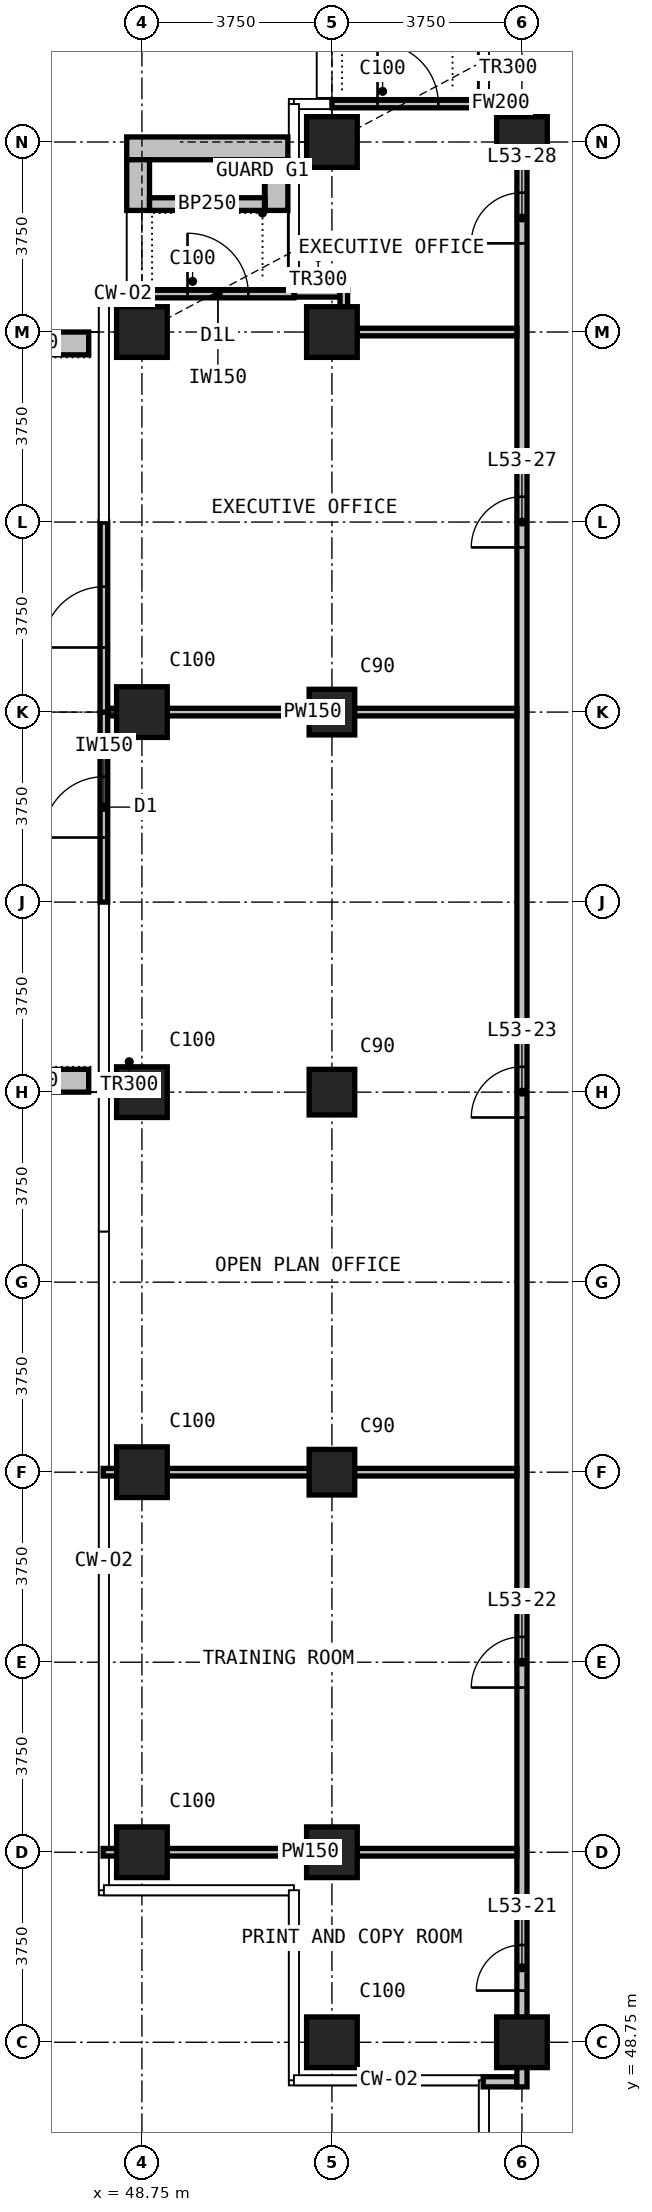
"""IFC4 building model, lengths in metres.
Left out: names, types, materials, properties, quantities, classifications, styles, units other than length and angle.
Written with IfcOpenShell. Run it as: python <this file> out.ifc"""

import sys

from ifc_helpers import new_model, si_unit, direction, frame, frame_2d, origin, origin_2d, place, context, subcontext, project, spatial, rectangle, extrude, element, fill, save


model = new_model("IFC4")
c1 = context("Model", 3, precision=1e-05, world=origin(), true_north=direction((0.0, 1.0)))
c2 = subcontext(c1, "Body", "Model", "MODEL_VIEW")
j1 = project(units=[si_unit("LENGTHUNIT", "METRE"), si_unit("PLANEANGLEUNIT", "RADIAN")], contexts=[c1])
p1 = place(None, origin())
s1 = spatial("IfcSite", under=j1, at=p1, CompositionType="ELEMENT")
p2 = place(p1, origin())
s2 = spatial("IfcBuilding", under=s1, at=p2, CompositionType="ELEMENT")
p3 = place(p2, frame((0.0, 0.0, 206.7)))
s3 = spatial("IfcBuildingStorey", under=s2, at=p3, CompositionType="ELEMENT", Elevation=206.7)
for number, where, z_axis, x_axis in (
    (1, (48.75, 52.5, 0.0), (0.0, 0.0, 1.0), (1.0, 0.0, 0.0)),
    (2, (48.75, 60.0, 0.0), (0.0, 0.0, 1.0), (1.0, 0.0, 0.0)),
    (3, (48.75, 67.5, 0.0), (0.0, 0.0, 1.0), (1.0, 0.0, 0.0)),
    (4, (48.75, 75.0, 0.0), (0.0, 0.0, 1.0), (1.0, 0.0, 0.0)),
    (5, (48.75, 82.5, 0.0), (0.0, 0.0, 1.0), (1.0, 0.0, 0.0)),
    (6, (52.5, 48.75, 0.0), (0.0, 0.0, 1.0), (1.0, 0.0, 0.0)),
    (7, (52.5, 52.5, 0.0), (0.0, 0.0, 1.0), (1.0, 0.0, 0.0)),
):
    element("IfcColumn", number, at=place(p3, frame(where, z_axis=z_axis, x_axis=x_axis)), inside=s3, PredefinedType="COLUMN", context=c2, shape_type="SweptSolid", body=[
        extrude(rectangle(XDim=1.0, YDim=1.0, at=origin_2d()), origin(), (0.0, 0.0, 1.0), 3.6),
    ])
for number, where, z_axis, x_axis in (
    (8, (52.5, 60.0, 0.0), (0.0, 0.0, 1.0), (1.0, 0.0, 0.0)),
    (9, (52.5, 67.5, 0.0), (0.0, 0.0, 1.0), (1.0, 0.0, 0.0)),
    (10, (52.5, 75.0, 0.0), (0.0, 0.0, 1.0), (1.0, 0.0, 0.0)),
):
    element("IfcColumn", number, at=place(p3, frame(where, z_axis=z_axis, x_axis=x_axis)), inside=s3, PredefinedType="COLUMN", context=c2, shape_type="SweptSolid", body=[
        extrude(rectangle(XDim=0.9, YDim=0.9, at=origin_2d()), origin(), (0.0, 0.0, 1.0), 3.6),
    ])
for number, where, z_axis, x_axis in (
    (11, (52.5, 82.5, 0.0), (0.0, 0.0, 1.0), (1.0, 0.0, 0.0)),
    (12, (52.5, 86.25, 0.0), (0.0, 0.0, 1.0), (1.0, 0.0, 0.0)),
    (13, (56.25, 48.75, 0.0), (0.0, 0.0, 1.0), (1.0, 0.0, 0.0)),
    (14, (56.25, 86.25, 0.0), (0.0, 0.0, 1.0), (1.0, 0.0, 0.0)),
):
    element("IfcColumn", number, at=place(p3, frame(where, z_axis=z_axis, x_axis=x_axis)), inside=s3, PredefinedType="COLUMN", context=c2, shape_type="SweptSolid", body=[
        extrude(rectangle(XDim=1.0, YDim=1.0, at=origin_2d()), origin(), (0.0, 0.0, 1.0), 3.6),
    ])
p4 = place(p3, frame((52.5, 87.0, 0.0), z_axis=(0.0, 0.0, 1.0), x_axis=(1.0, 0.0, 0.0)))
e15 = element("IfcWall", 15, at=p4, inside=s3, PredefinedType="SOLIDWALL", context=c2, shape_type="SweptSolid", body=[
    extrude(rectangle(XDim=3.0, YDim=0.15, at=frame_2d((1.5, 0.0))), origin(), (0.0, 0.0, 1.0), 3.3),
])
p5 = place(p4, frame((0.9, 0.0, 0.0)))
e16 = element("IfcOpeningElement", 16, at=p5, cuts=e15, PredefinedType="OPENING", context=c2, shape_type="SweptSolid", body=[
    extrude(rectangle(XDim=1.2, YDim=2.0, at=frame_2d((0.6, 1.0))), frame((0.0, 0.085, 0.0), z_axis=(0.0, -1.0, 0.0), x_axis=(1.0, 0.0, 0.0)), (0.0, 0.0, 1.0), 0.17),
])
p6 = place(p3, frame((48.75, 83.25, 0.0), z_axis=(0.0, 0.0, 1.0), x_axis=(1.0, 0.0, 0.0)))
e17 = element("IfcWall", 17, at=p6, inside=s3, PredefinedType="SOLIDWALL", context=c2, shape_type="SweptSolid", body=[
    extrude(rectangle(XDim=3.0, YDim=0.15, at=frame_2d((1.5, 0.0))), origin(), (0.0, 0.0, 1.0), 3.3),
])
p7 = place(p6, frame((0.9, 0.0, 0.0)))
e18 = element("IfcOpeningElement", 18, at=p7, cuts=e17, PredefinedType="OPENING", context=c2, shape_type="SweptSolid", body=[
    extrude(rectangle(XDim=1.2, YDim=2.0, at=frame_2d((0.6, 1.0))), frame((0.0, 0.085, 0.0), z_axis=(0.0, -1.0, 0.0), x_axis=(1.0, 0.0, 0.0)), (0.0, 0.0, 1.0), 0.17),
])
p8 = place(p3, frame((48.0, 71.25, 0.0), z_axis=(0.0, 0.0, 1.0), x_axis=(0.0, 1.0, 0.0)))
e19 = element("IfcWall", 19, at=p8, inside=s3, PredefinedType="SOLIDWALL", context=c2, shape_type="SweptSolid", body=[
    extrude(rectangle(XDim=3.75, YDim=0.15, at=frame_2d((1.875, 0.0))), origin(), (0.0, 0.0, 1.0), 3.3),
])
p9 = place(p8, frame((1.275, 0.0, 0.0)))
e20 = element("IfcOpeningElement", 20, at=p9, cuts=e19, PredefinedType="OPENING", context=c2, shape_type="SweptSolid", body=[
    extrude(rectangle(XDim=1.2, YDim=2.4, at=frame_2d((0.6, 1.2))), frame((0.0, 0.085, 0.0), z_axis=(0.0, -1.0, 0.0), x_axis=(1.0, 0.0, 0.0)), (0.0, 0.0, 1.0), 0.17),
])
p10 = place(p3, frame((48.0, 75.0, 0.0), z_axis=(0.0, 0.0, 1.0), x_axis=(0.0, 1.0, 0.0)))
e21 = element("IfcWall", 21, at=p10, inside=s3, PredefinedType="SOLIDWALL", context=c2, shape_type="SweptSolid", body=[
    extrude(rectangle(XDim=3.75, YDim=0.15, at=frame_2d((1.875, 0.0))), origin(), (0.0, 0.0, 1.0), 3.3),
])
p11 = place(p10, frame((1.275, 0.0, 0.0)))
e22 = element("IfcOpeningElement", 22, at=p11, cuts=e21, PredefinedType="OPENING", context=c2, shape_type="SweptSolid", body=[
    extrude(rectangle(XDim=1.2, YDim=2.4, at=frame_2d((0.6, 1.2))), frame((0.0, 0.085, 0.0), z_axis=(0.0, -1.0, 0.0), x_axis=(1.0, 0.0, 0.0)), (0.0, 0.0, 1.0), 0.17),
])
p12 = place(p3, frame((48.45, 86.125, 0.0), z_axis=(0.0, 0.0, 1.0), x_axis=(1.0, 0.0, 0.0)))
e23 = element("IfcWall", 23, at=p12, inside=s3, PredefinedType="USERDEFINED", context=c2, shape_type="SweptSolid", body=[
    extrude(rectangle(XDim=3.18, YDim=0.45, at=frame_2d((1.59, 0.0))), origin(), (0.0, 0.0, 1.0), 1.1),
])
for number, where, z_axis, x_axis in (
    (24, (48.675, 84.9, 0.0), (0.0, 0.0, 1.0), (0.0, 1.0, 0.0)),
    (25, (51.405, 84.9, 0.0), (0.0, 0.0, 1.0), (0.0, 1.0, 0.0)),
):
    element("IfcWall", number, at=place(p3, frame(where, z_axis=z_axis, x_axis=x_axis)), inside=s3, PredefinedType="USERDEFINED", context=c2, shape_type="SweptSolid", body=[
        extrude(rectangle(XDim=1.0, YDim=0.45, at=frame_2d((0.5, 0.0))), origin(), (0.0, 0.0, 1.0), 1.1),
    ])
p13 = place(p3, frame((48.9, 85.025, 0.0), z_axis=(0.0, 0.0, 1.0), x_axis=(1.0, 0.0, 0.0)))
e26 = element("IfcWall", 26, at=p13, inside=s3, PredefinedType="USERDEFINED", context=c2, shape_type="SweptSolid", body=[
    extrude(rectangle(XDim=2.28, YDim=0.25, at=frame_2d((1.14, 0.0))), origin(), (0.0, 0.0, 1.0), 1.0),
])
for number, where, z_axis, x_axis in (
    (27, (47.7, 67.725, 0.0), (0.0, 0.0, 1.0), (-1.0, 0.0, 0.0)),
    (28, (47.7, 82.275, 0.0), (0.0, 0.0, 1.0), (-1.0, 0.0, 0.0)),
):
    element("IfcWall", number, at=place(p3, frame(where, z_axis=z_axis, x_axis=x_axis)), inside=s3, PredefinedType="USERDEFINED", context=c2, shape_type="SweptSolid", body=[
        extrude(rectangle(XDim=2.35, YDim=0.45, at=frame_2d((1.175, 0.0))), origin(), (0.0, 0.0, 1.0), 1.1),
    ])
p14 = place(p3, frame((55.485, 47.97, 0.0), z_axis=(0.0, 0.0, 1.0), x_axis=(1.0, 0.0, 0.0)))
e29 = element("IfcWall", 29, at=p14, inside=s3, PredefinedType="PARTITIONING", context=c2, shape_type="SweptSolid", body=[
    extrude(rectangle(XDim=0.665, YDim=0.2, at=frame_2d((0.333, 0.0))), origin(), (0.0, 0.0, 1.0), 3.3),
])
p15 = place(p3, frame((55.51, 87.03, 0.0), z_axis=(0.0, 0.0, 1.0), x_axis=(1.0, 0.0, 0.0)))
e30 = element("IfcWall", 30, at=p15, inside=s3, PredefinedType="PARTITIONING", context=c2, shape_type="SweptSolid", body=[
    extrude(rectangle(XDim=0.64, YDim=0.2, at=frame_2d((0.32, 0.0))), origin(), (0.0, 0.0, 1.0), 3.3),
])
p16 = place(p3, frame((56.25, 47.87, 0.0), z_axis=(0.0, 0.0, 1.0), x_axis=(0.0, 1.0, 0.0)))
e31 = element("IfcWall", 31, at=p16, inside=s3, PredefinedType="PARTITIONING", context=c2, shape_type="SweptSolid", body=[
    extrude(rectangle(XDim=39.26, YDim=0.2, at=frame_2d((19.63, 0.0))), origin(), (0.0, 0.0, 1.0), 3.3),
])
p17 = place(p16, frame((1.9, 0.0, 0.0)))
e32 = element("IfcOpeningElement", 32, at=p17, cuts=e31, PredefinedType="OPENING", context=c2, shape_type="SweptSolid", body=[
    extrude(rectangle(XDim=0.9, YDim=2.2, at=frame_2d((0.45, 1.1))), frame((0.0, 0.11, 0.0), z_axis=(0.0, -1.0, 0.0), x_axis=(1.0, 0.0, 0.0)), (0.0, 0.0, 1.0), 0.22),
])
p18 = place(p16, frame((7.88, 0.0, 0.0)))
e33 = element("IfcOpeningElement", 33, at=p18, cuts=e31, PredefinedType="OPENING", context=c2, shape_type="SweptSolid", body=[
    extrude(rectangle(XDim=1.0, YDim=2.2, at=frame_2d((0.5, 1.1))), frame((0.0, 0.11, 0.0), z_axis=(0.0, -1.0, 0.0), x_axis=(1.0, 0.0, 0.0)), (0.0, 0.0, 1.0), 0.22),
])
p19 = place(p16, frame((19.13, 0.0, 0.0)))
e34 = element("IfcOpeningElement", 34, at=p19, cuts=e31, PredefinedType="OPENING", context=c2, shape_type="SweptSolid", body=[
    extrude(rectangle(XDim=1.0, YDim=2.2, at=frame_2d((0.5, 1.1))), frame((0.0, 0.11, 0.0), z_axis=(0.0, -1.0, 0.0), x_axis=(1.0, 0.0, 0.0)), (0.0, 0.0, 1.0), 0.22),
])
p20 = place(p16, frame((30.38, 0.0, 0.0)))
e35 = element("IfcOpeningElement", 35, at=p20, cuts=e31, PredefinedType="OPENING", context=c2, shape_type="SweptSolid", body=[
    extrude(rectangle(XDim=1.0, YDim=2.2, at=frame_2d((0.5, 1.1))), frame((0.0, 0.11, 0.0), z_axis=(0.0, -1.0, 0.0), x_axis=(1.0, 0.0, 0.0)), (0.0, 0.0, 1.0), 0.22),
])
p21 = place(p16, frame((36.38, 0.0, 0.0)))
e36 = element("IfcOpeningElement", 36, at=p21, cuts=e31, PredefinedType="OPENING", context=c2, shape_type="SweptSolid", body=[
    extrude(rectangle(XDim=1.0, YDim=2.2, at=frame_2d((0.5, 1.1))), frame((0.0, 0.11, 0.0), z_axis=(0.0, -1.0, 0.0), x_axis=(1.0, 0.0, 0.0)), (0.0, 0.0, 1.0), 0.22),
])
for number, where, z_axis, x_axis in (
    (37, (47.985, 52.5, 0.0), (0.0, 0.0, 1.0), (1.0, 0.0, 0.0)),
    (38, (47.985, 60.0, 0.0), (0.0, 0.0, 1.0), (1.0, 0.0, 0.0)),
):
    element("IfcWall", number, at=place(p3, frame(where, z_axis=z_axis, x_axis=x_axis)), inside=s3, PredefinedType="PARTITIONING", context=c2, shape_type="SweptSolid", body=[
        extrude(rectangle(XDim=8.165, YDim=0.15, at=frame_2d((4.083, 0.0))), origin(), (0.0, 0.0, 1.0), 3.3),
    ])
p22 = place(p3, frame((48.085, 75.0, 0.0), z_axis=(0.0, 0.0, 1.0), x_axis=(1.0, 0.0, 0.0)))
e39 = element("IfcWall", 39, at=p22, inside=s3, PredefinedType="PARTITIONING", context=c2, shape_type="SweptSolid", body=[
    extrude(rectangle(XDim=8.065, YDim=0.15, at=frame_2d((4.032, 0.0))), origin(), (0.0, 0.0, 1.0), 3.3),
])
p23 = place(p3, frame((52.81, 82.5, 0.0), z_axis=(0.0, 0.0, 1.0), x_axis=(1.0, 0.0, 0.0)))
e40 = element("IfcWall", 40, at=p23, inside=s3, PredefinedType="PARTITIONING", context=c2, shape_type="SweptSolid", body=[
    extrude(rectangle(XDim=3.34, YDim=0.15, at=frame_2d((1.67, 0.0))), origin(), (0.0, 0.0, 1.0), 3.3),
])
p24 = place(p3, frame((51.76, 83.265, 0.0), z_axis=(0.0, 0.0, 1.0), x_axis=(1.0, 0.0, 0.0)))
e41 = element("IfcWall", 41, at=p24, inside=s3, PredefinedType="PARTITIONING", context=c2, shape_type="SweptSolid", body=[
    extrude(rectangle(XDim=0.9, YDim=0.15, at=frame_2d((0.45, 0.0))), origin(), (0.0, 0.0, 1.0), 3.3),
])
p25 = place(p3, frame((52.735, 82.425, 0.0), z_axis=(0.0, 0.0, 1.0), x_axis=(0.0, 1.0, 0.0)))
e42 = element("IfcWall", 42, at=p25, inside=s3, PredefinedType="PARTITIONING", context=c2, shape_type="SweptSolid", body=[
    extrude(rectangle(XDim=0.915, YDim=0.15, at=frame_2d((0.458, 0.0))), origin(), (0.0, 0.0, 1.0), 3.3),
])
p26 = place(p5, origin())
e43 = element("IfcDoor", 43, at=p26, inside=s3, OperationType="SINGLE_SWING_LEFT", PredefinedType="DOOR", context=c2, shape_type="SweptSolid", body=[
    extrude(rectangle(XDim=1.2, YDim=2.0, at=frame_2d((0.6, 1.0))), frame((0.0, 0.025, 0.0), z_axis=(0.0, -1.0, 0.0), x_axis=(1.0, 0.0, 0.0)), (0.0, 0.0, 1.0), 0.05),
])
fill(e16, e43)
p27 = place(p7, origin())
e44 = element("IfcDoor", 44, at=p27, inside=s3, OperationType="SINGLE_SWING_LEFT", PredefinedType="DOOR", context=c2, shape_type="SweptSolid", body=[
    extrude(rectangle(XDim=1.2, YDim=2.0, at=frame_2d((0.6, 1.0))), frame((0.0, 0.025, 0.0), z_axis=(0.0, -1.0, 0.0), x_axis=(1.0, 0.0, 0.0)), (0.0, 0.0, 1.0), 0.05),
])
fill(e18, e44)
p28 = place(p9, origin())
e45 = element("IfcDoor", 45, at=p28, inside=s3, OperationType="SINGLE_SWING_LEFT", PredefinedType="DOOR", context=c2, shape_type="SweptSolid", body=[
    extrude(rectangle(XDim=1.2, YDim=2.4, at=frame_2d((0.6, 1.2))), frame((0.0, 0.025, 0.0), z_axis=(0.0, -1.0, 0.0), x_axis=(1.0, 0.0, 0.0)), (0.0, 0.0, 1.0), 0.05),
])
fill(e20, e45)
p29 = place(p11, origin())
e46 = element("IfcDoor", 46, at=p29, inside=s3, OperationType="SINGLE_SWING_LEFT", PredefinedType="DOOR", context=c2, shape_type="SweptSolid", body=[
    extrude(rectangle(XDim=1.2, YDim=2.4, at=frame_2d((0.6, 1.2))), frame((0.0, 0.025, 0.0), z_axis=(0.0, -1.0, 0.0), x_axis=(1.0, 0.0, 0.0)), (0.0, 0.0, 1.0), 0.05),
])
fill(e22, e46)
p30 = place(p17, origin())
e47 = element("IfcDoor", 47, at=p30, inside=s3, OperationType="SINGLE_SWING_RIGHT", PredefinedType="DOOR", context=c2, shape_type="SweptSolid", body=[
    extrude(rectangle(XDim=0.9, YDim=2.2, at=frame_2d((0.45, 1.1))), frame((0.0, 0.025, 0.0), z_axis=(0.0, -1.0, 0.0), x_axis=(1.0, 0.0, 0.0)), (0.0, 0.0, 1.0), 0.05),
])
fill(e32, e47)
p31 = place(p18, origin())
e48 = element("IfcDoor", 48, at=p31, inside=s3, OperationType="SINGLE_SWING_LEFT", PredefinedType="DOOR", context=c2, shape_type="SweptSolid", body=[
    extrude(rectangle(XDim=1.0, YDim=2.2, at=frame_2d((0.5, 1.1))), frame((0.0, 0.025, 0.0), z_axis=(0.0, -1.0, 0.0), x_axis=(1.0, 0.0, 0.0)), (0.0, 0.0, 1.0), 0.05),
])
fill(e33, e48)
p32 = place(p19, origin())
e49 = element("IfcDoor", 49, at=p32, inside=s3, OperationType="SINGLE_SWING_LEFT", PredefinedType="DOOR", context=c2, shape_type="SweptSolid", body=[
    extrude(rectangle(XDim=1.0, YDim=2.2, at=frame_2d((0.5, 1.1))), frame((0.0, 0.025, 0.0), z_axis=(0.0, -1.0, 0.0), x_axis=(1.0, 0.0, 0.0)), (0.0, 0.0, 1.0), 0.05),
])
fill(e34, e49)
p33 = place(p20, origin())
e50 = element("IfcDoor", 50, at=p33, inside=s3, OperationType="SINGLE_SWING_LEFT", PredefinedType="DOOR", context=c2, shape_type="SweptSolid", body=[
    extrude(rectangle(XDim=1.0, YDim=2.2, at=frame_2d((0.5, 1.1))), frame((0.0, 0.025, 0.0), z_axis=(0.0, -1.0, 0.0), x_axis=(1.0, 0.0, 0.0)), (0.0, 0.0, 1.0), 0.05),
])
fill(e35, e50)
p34 = place(p21, origin())
e51 = element("IfcDoor", 51, at=p34, inside=s3, OperationType="SINGLE_SWING_LEFT", PredefinedType="DOOR", context=c2, shape_type="SweptSolid", body=[
    extrude(rectangle(XDim=1.0, YDim=2.2, at=frame_2d((0.5, 1.1))), frame((0.0, 0.025, 0.0), z_axis=(0.0, -1.0, 0.0), x_axis=(1.0, 0.0, 0.0)), (0.0, 0.0, 1.0), 0.05),
])
fill(e36, e51)
save(model, sys.argv[1])
